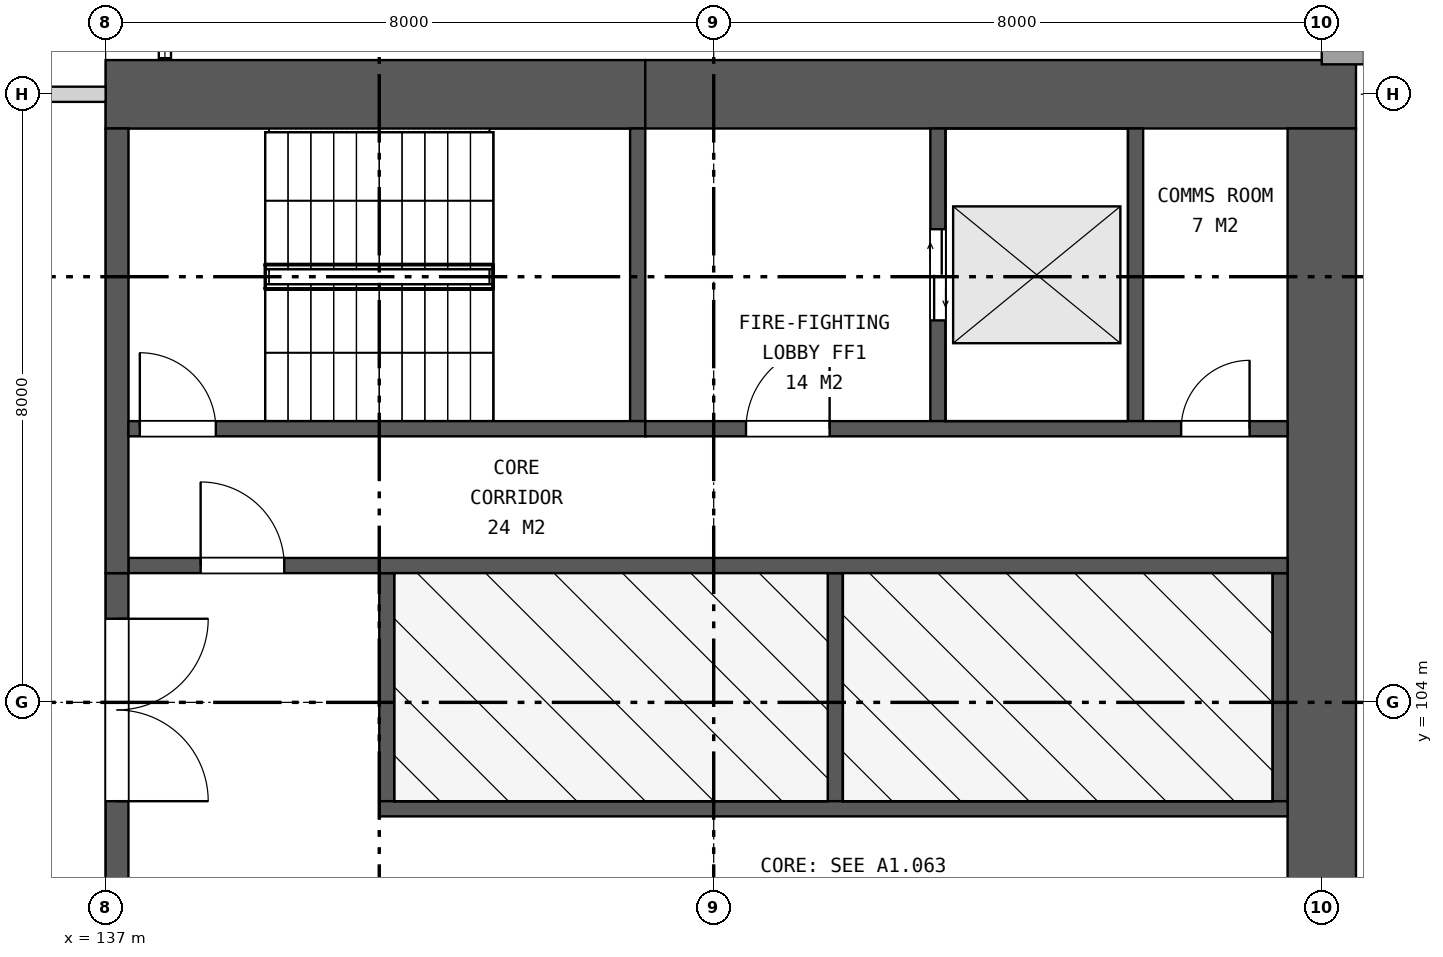
"""IFC4 building model, lengths in metres.
Left out: names, types, materials, properties, quantities, classifications, styles, units other than length and angle.
Written with IfcOpenShell. Run it as: python <this file> out.ifc"""

import sys

from ifc_helpers import new_model, si_unit, direction, frame, frame_2d, origin, place, context, subcontext, project, spatial, rectangle, extrude, element, fill, save


model = new_model("IFC4")
c1 = context("Model", 3, precision=1e-05, world=origin(), true_north=direction((0.0, 1.0)))
c2 = subcontext(c1, "Body", "Model", "MODEL_VIEW")
j1 = project(units=[si_unit("LENGTHUNIT", "METRE"), si_unit("PLANEANGLEUNIT", "RADIAN")], contexts=[c1])
p1 = place(None, origin())
s1 = spatial("IfcSite", under=j1, at=p1, CompositionType="ELEMENT")
p2 = place(p1, origin())
s2 = spatial("IfcBuilding", under=s1, at=p2, CompositionType="ELEMENT")
p3 = place(p2, frame((0.0, 0.0, 41.5)))
s3 = spatial("IfcBuildingStorey", under=s2, at=p3, CompositionType="ELEMENT", Elevation=41.5)
p4 = place(p3, frame((137.0, 112.0, 0.0), z_axis=(0.0, 0.0, 1.0), x_axis=(1.0, 0.0, 0.0)))
e1 = element("IfcWall", 1, at=p4, inside=s3, PredefinedType="SHEAR", context=c2, shape_type="SweptSolid", body=[
    extrude(rectangle(XDim=7.1, YDim=0.9, at=frame_2d((3.55, 0.0))), origin(), (0.0, 0.0, 1.0), 6.0),
])
p5 = place(p3, frame((144.1, 112.0, 0.0), z_axis=(0.0, 0.0, 1.0), x_axis=(1.0, 0.0, 0.0)))
e2 = element("IfcWall", 2, at=p5, inside=s3, PredefinedType="SHEAR", context=c2, shape_type="SweptSolid", body=[
    extrude(rectangle(XDim=9.35, YDim=0.9, at=frame_2d((4.675, 0.0))), origin(), (0.0, 0.0, 1.0), 6.0),
])
p6 = place(p3, frame((153.0, 88.45, 0.0), z_axis=(0.0, 0.0, 1.0), x_axis=(0.0, 1.0, 0.0)))
e3 = element("IfcWall", 3, at=p6, inside=s3, PredefinedType="SHEAR", context=c2, shape_type="SweptSolid", body=[
    extrude(rectangle(XDim=23.1, YDim=0.9, at=frame_2d((11.55, 0.0))), origin(), (0.0, 0.0, 1.0), 6.0),
])
p7 = place(p6, frame((10.35, 0.0, 0.0)))
e4 = element("IfcOpeningElement", 4, at=p7, cuts=e3, PredefinedType="OPENING", context=c2, shape_type="SweptSolid", body=[
    extrude(rectangle(XDim=2.4, YDim=2.4, at=frame_2d((1.2, 1.2))), frame((0.0, 0.46, 0.0), z_axis=(0.0, -1.0, 0.0), x_axis=(1.0, 0.0, 0.0)), (0.0, 0.0, 1.0), 0.92),
])
p8 = place(p3, frame((137.15, 94.3, 0.0), z_axis=(0.0, 0.0, 1.0), x_axis=(0.0, 1.0, 0.0)))
e5 = element("IfcWall", 5, at=p8, inside=s3, PredefinedType="SHEAR", context=c2, shape_type="SweptSolid", body=[
    extrude(rectangle(XDim=11.4, YDim=0.3, at=frame_2d((5.7, 0.0))), origin(), (0.0, 0.0, 1.0), 6.0),
])
p9 = place(p8, frame((0.6, 0.0, 0.0)))
e6 = element("IfcOpeningElement", 6, at=p9, cuts=e5, PredefinedType="OPENING", context=c2, shape_type="SweptSolid", body=[
    extrude(rectangle(XDim=2.4, YDim=2.4, at=frame_2d((1.2, 1.2))), frame((0.0, 0.16, 0.0), z_axis=(0.0, -1.0, 0.0), x_axis=(1.0, 0.0, 0.0)), (0.0, 0.0, 1.0), 0.32),
])
p10 = place(p8, frame((4.5, 0.0, 0.0)))
e7 = element("IfcOpeningElement", 7, at=p10, cuts=e5, PredefinedType="OPENING", context=c2, shape_type="SweptSolid", body=[
    extrude(rectangle(XDim=2.4, YDim=2.4, at=frame_2d((1.2, 1.2))), frame((0.0, 0.16, 0.0), z_axis=(0.0, -1.0, 0.0), x_axis=(1.0, 0.0, 0.0)), (0.0, 0.0, 1.0), 0.32),
])
p11 = place(p8, frame((8.4, 0.0, 0.0)))
e8 = element("IfcOpeningElement", 8, at=p11, cuts=e5, PredefinedType="OPENING", context=c2, shape_type="SweptSolid", body=[
    extrude(rectangle(XDim=2.4, YDim=2.4, at=frame_2d((1.2, 1.2))), frame((0.0, 0.16, 0.0), z_axis=(0.0, -1.0, 0.0), x_axis=(1.0, 0.0, 0.0)), (0.0, 0.0, 1.0), 0.32),
])
for number, where, z_axis, x_axis in (
    (9, (140.7, 102.7, 0.0), (0.0, 0.0, 1.0), (0.0, 1.0, 0.0)),
    (10, (146.6, 102.7, 0.0), (0.0, 0.0, 1.0), (0.0, 1.0, 0.0)),
    (11, (152.45, 102.7, 0.0), (0.0, 0.0, 1.0), (0.0, 1.0, 0.0)),
):
    element("IfcWall", number, at=place(p3, frame(where, z_axis=z_axis, x_axis=x_axis)), inside=s3, PredefinedType="SHEAR", context=c2, shape_type="SweptSolid", body=[
        extrude(rectangle(XDim=3.0, YDim=0.2, at=frame_2d((1.5, 0.0))), origin(), (0.0, 0.0, 1.0), 6.0),
    ])
p12 = place(p3, frame((140.6, 102.6, 0.0), z_axis=(0.0, 0.0, 1.0), x_axis=(1.0, 0.0, 0.0)))
e12 = element("IfcWall", 12, at=p12, inside=s3, PredefinedType="SHEAR", context=c2, shape_type="SweptSolid", body=[
    extrude(rectangle(XDim=11.95, YDim=0.2, at=frame_2d((5.975, 0.0))), origin(), (0.0, 0.0, 1.0), 6.0),
])
p13 = place(p3, frame((137.3, 105.8, 0.0), z_axis=(0.0, 0.0, 1.0), x_axis=(1.0, 0.0, 0.0)))
e13 = element("IfcWall", 13, at=p13, inside=s3, PredefinedType="SHEAR", context=c2, shape_type="SweptSolid", body=[
    extrude(rectangle(XDim=15.25, YDim=0.2, at=frame_2d((7.625, 0.0))), origin(), (0.0, 0.0, 1.0), 6.0),
])
p14 = place(p13, frame((0.95, 0.0, 0.0)))
e14 = element("IfcOpeningElement", 14, at=p14, cuts=e13, PredefinedType="OPENING", context=c2, shape_type="SweptSolid", body=[
    extrude(rectangle(XDim=1.1, YDim=2.1, at=frame_2d((0.55, 1.05))), frame((0.0, 0.11, 0.0), z_axis=(0.0, -1.0, 0.0), x_axis=(1.0, 0.0, 0.0)), (0.0, 0.0, 1.0), 0.22),
])
p15 = place(p3, frame((137.15, 105.7, 0.0), z_axis=(0.0, 0.0, 1.0), x_axis=(0.0, 1.0, 0.0)))
e15 = element("IfcWall", 15, at=p15, inside=s3, PredefinedType="SHEAR", context=c2, shape_type="SweptSolid", body=[
    extrude(rectangle(XDim=5.85, YDim=0.3, at=frame_2d((2.925, 0.0))), origin(), (0.0, 0.0, 1.0), 6.0),
])
p16 = place(p3, frame((144.0, 107.7, 0.0), z_axis=(0.0, 0.0, 1.0), x_axis=(0.0, 1.0, 0.0)))
e16 = element("IfcWall", 16, at=p16, inside=s3, PredefinedType="SHEAR", context=c2, shape_type="SweptSolid", body=[
    extrude(rectangle(XDim=3.85, YDim=0.2, at=frame_2d((1.925, 0.0))), origin(), (0.0, 0.0, 1.0), 6.0),
])
p17 = place(p3, frame((147.95, 107.7, 0.0), z_axis=(0.0, 0.0, 1.0), x_axis=(0.0, 1.0, 0.0)))
e17 = element("IfcWall", 17, at=p17, inside=s3, PredefinedType="SHEAR", context=c2, shape_type="SweptSolid", body=[
    extrude(rectangle(XDim=3.85, YDim=0.2, at=frame_2d((1.925, 0.0))), origin(), (0.0, 0.0, 1.0), 6.0),
])
p18 = place(p17, frame((1.325, 0.0, 0.0)))
e18 = element("IfcOpeningElement", 18, at=p18, cuts=e17, PredefinedType="OPENING", context=c2, shape_type="SweptSolid", body=[
    extrude(rectangle(XDim=1.2, YDim=2.1, at=frame_2d((0.6, 1.05))), frame((0.0, 0.11, 0.0), z_axis=(0.0, -1.0, 0.0), x_axis=(1.0, 0.0, 0.0)), (0.0, 0.0, 1.0), 0.22),
])
p19 = place(p3, frame((150.55, 107.7, 0.0), z_axis=(0.0, 0.0, 1.0), x_axis=(0.0, 1.0, 0.0)))
e19 = element("IfcWall", 19, at=p19, inside=s3, PredefinedType="SHEAR", context=c2, shape_type="SweptSolid", body=[
    extrude(rectangle(XDim=3.85, YDim=0.2, at=frame_2d((1.925, 0.0))), origin(), (0.0, 0.0, 1.0), 6.0),
])
p20 = place(p3, frame((137.3, 107.6, 0.0), z_axis=(0.0, 0.0, 1.0), x_axis=(1.0, 0.0, 0.0)))
e20 = element("IfcWall", 20, at=p20, inside=s3, PredefinedType="SHEAR", context=c2, shape_type="SweptSolid", body=[
    extrude(rectangle(XDim=6.8, YDim=0.2, at=frame_2d((3.4, 0.0))), origin(), (0.0, 0.0, 1.0), 6.0),
])
p21 = place(p20, frame((0.15, 0.0, 0.0)))
e21 = element("IfcOpeningElement", 21, at=p21, cuts=e20, PredefinedType="OPENING", context=c2, shape_type="SweptSolid", body=[
    extrude(rectangle(XDim=1.0, YDim=2.1, at=frame_2d((0.5, 1.05))), frame((0.0, 0.11, 0.0), z_axis=(0.0, -1.0, 0.0), x_axis=(1.0, 0.0, 0.0)), (0.0, 0.0, 1.0), 0.22),
])
p22 = place(p3, frame((144.1, 107.6, 0.0), z_axis=(0.0, 0.0, 1.0), x_axis=(1.0, 0.0, 0.0)))
e22 = element("IfcWall", 22, at=p22, inside=s3, PredefinedType="SHEAR", context=c2, shape_type="SweptSolid", body=[
    extrude(rectangle(XDim=8.45, YDim=0.2, at=frame_2d((4.225, 0.0))), origin(), (0.0, 0.0, 1.0), 6.0),
])
p23 = place(p22, frame((1.325, 0.0, 0.0)))
e23 = element("IfcOpeningElement", 23, at=p23, cuts=e22, PredefinedType="OPENING", context=c2, shape_type="SweptSolid", body=[
    extrude(rectangle(XDim=1.1, YDim=2.1, at=frame_2d((0.55, 1.05))), frame((0.0, 0.11, 0.0), z_axis=(0.0, -1.0, 0.0), x_axis=(1.0, 0.0, 0.0)), (0.0, 0.0, 1.0), 0.22),
])
p24 = place(p22, frame((7.05, 0.0, 0.0)))
e24 = element("IfcOpeningElement", 24, at=p24, cuts=e22, PredefinedType="OPENING", context=c2, shape_type="SweptSolid", body=[
    extrude(rectangle(XDim=0.9, YDim=2.1, at=frame_2d((0.45, 1.05))), frame((0.0, 0.11, 0.0), z_axis=(0.0, -1.0, 0.0), x_axis=(1.0, 0.0, 0.0)), (0.0, 0.0, 1.0), 0.22),
])
p25 = place(p3, frame((153.0, 112.547, 0.0), z_axis=(0.0, 0.0, 1.0), x_axis=(1.0, 0.0, 0.0)))
e25 = element("IfcWall", 25, at=p25, inside=s3, PredefinedType="SOLIDWALL", context=c2, shape_type="SweptSolid", body=[
    extrude(rectangle(XDim=0.555, YDim=0.306, at=frame_2d((0.277, 0.0))), origin(), (0.0, 0.0, 1.0), 5.6),
])
p26 = place(p3, frame((129.6, 112.0, 0.0), z_axis=(0.0, 0.0, 1.0), x_axis=(1.0, 0.0, 0.0)))
e26 = element("IfcWall", 26, at=p26, inside=s3, PredefinedType="PARTITIONING", context=c2, shape_type="SweptSolid", body=[
    extrude(rectangle(XDim=7.4, YDim=0.2, at=frame_2d((3.7, 0.0))), origin(), (0.0, 0.0, 1.0), 5.055),
])
p27 = place(p11, frame((2.4, 0.0, 0.0), z_axis=(0.0, 0.0, 1.0), x_axis=(-1.0, 0.0, 0.0)))
e27 = element("IfcDoor", 27, at=p27, inside=s3, OperationType="DOUBLE_DOOR_SINGLE_SWING", PredefinedType="DOOR", context=c2, shape_type="SweptSolid", body=[
    extrude(rectangle(XDim=2.4, YDim=2.4, at=frame_2d((1.2, 1.2))), frame((0.0, 0.025, 0.0), z_axis=(0.0, -1.0, 0.0), x_axis=(1.0, 0.0, 0.0)), (0.0, 0.0, 1.0), 0.05),
])
fill(e8, e27)
p28 = place(p14, origin())
e28 = element("IfcDoor", 28, at=p28, inside=s3, OperationType="SINGLE_SWING_LEFT", PredefinedType="DOOR", context=c2, shape_type="SweptSolid", body=[
    extrude(rectangle(XDim=1.1, YDim=2.1, at=frame_2d((0.55, 1.05))), frame((0.0, 0.025, 0.0), z_axis=(0.0, -1.0, 0.0), x_axis=(1.0, 0.0, 0.0)), (0.0, 0.0, 1.0), 0.05),
])
fill(e14, e28)
p29 = place(p18, origin())
e29 = element("IfcDoor", 29, at=p29, inside=s3, OperationType="DOUBLE_DOOR_SLIDING", PredefinedType="DOOR", context=c2, shape_type="SweptSolid", body=[
    extrude(rectangle(XDim=1.2, YDim=2.1, at=frame_2d((0.6, 1.05))), frame((0.0, 0.025, 0.0), z_axis=(0.0, -1.0, 0.0), x_axis=(1.0, 0.0, 0.0)), (0.0, 0.0, 1.0), 0.05),
])
fill(e18, e29)
p30 = place(p21, origin())
e30 = element("IfcDoor", 30, at=p30, inside=s3, OperationType="SINGLE_SWING_LEFT", PredefinedType="DOOR", context=c2, shape_type="SweptSolid", body=[
    extrude(rectangle(XDim=1.0, YDim=2.1, at=frame_2d((0.5, 1.05))), frame((0.0, 0.025, 0.0), z_axis=(0.0, -1.0, 0.0), x_axis=(1.0, 0.0, 0.0)), (0.0, 0.0, 1.0), 0.05),
])
fill(e21, e30)
p31 = place(p23, origin())
e31 = element("IfcDoor", 31, at=p31, inside=s3, OperationType="SINGLE_SWING_RIGHT", PredefinedType="DOOR", context=c2, shape_type="SweptSolid", body=[
    extrude(rectangle(XDim=1.1, YDim=2.1, at=frame_2d((0.55, 1.05))), frame((0.0, 0.025, 0.0), z_axis=(0.0, -1.0, 0.0), x_axis=(1.0, 0.0, 0.0)), (0.0, 0.0, 1.0), 0.05),
])
fill(e23, e31)
p32 = place(p24, origin())
e32 = element("IfcDoor", 32, at=p32, inside=s3, OperationType="SINGLE_SWING_RIGHT", PredefinedType="DOOR", context=c2, shape_type="SweptSolid", body=[
    extrude(rectangle(XDim=0.9, YDim=2.1, at=frame_2d((0.45, 1.05))), frame((0.0, 0.025, 0.0), z_axis=(0.0, -1.0, 0.0), x_axis=(1.0, 0.0, 0.0)), (0.0, 0.0, 1.0), 0.05),
])
fill(e24, e32)
save(model, sys.argv[1])
